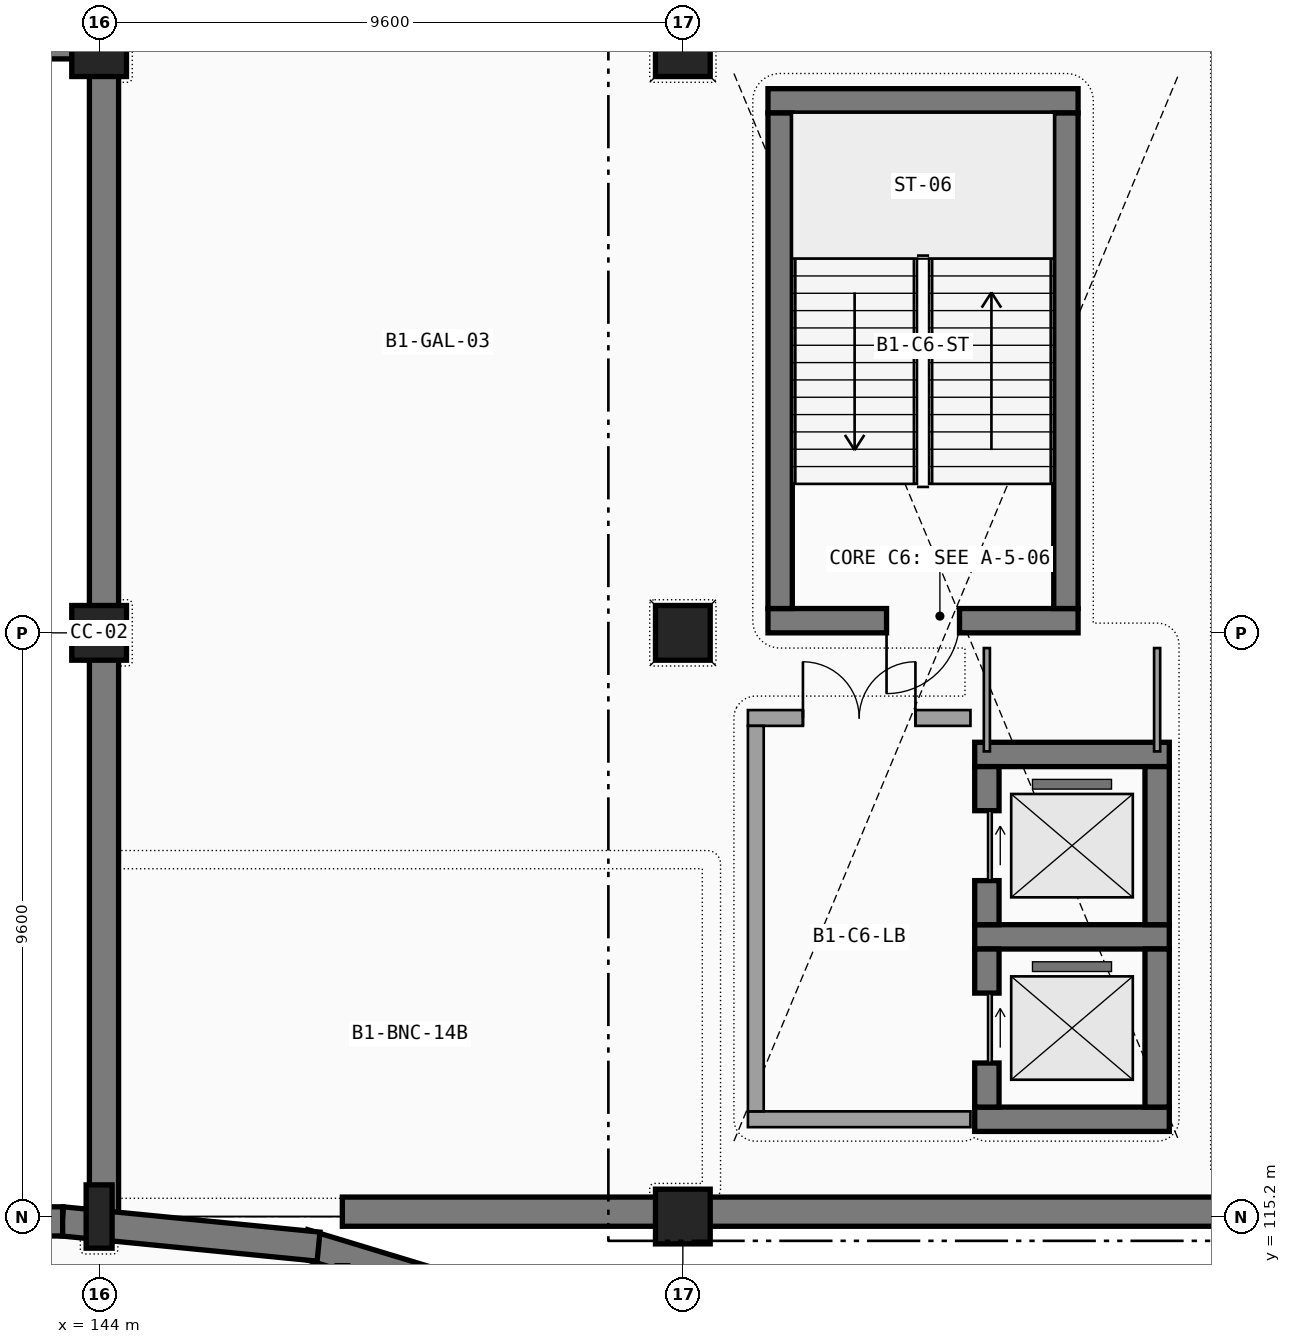
"""IFC4 building model, lengths in metres.
Left out: names, types, materials, properties, quantities, classifications, styles, units other than length and angle.
Written with IfcOpenShell. Run it as: python <this file> out.ifc"""

import sys

from ifc_helpers import new_model, si_unit, direction, frame, frame_2d, origin, origin_2d, place, context, subcontext, project, spatial, rectangle, i_section, extrude, element, fill, save


model = new_model("IFC4")
c1 = context("Model", 3, precision=1e-05, world=origin(), true_north=direction((0.0, 1.0)))
c2 = subcontext(c1, "Body", "Model", "MODEL_VIEW")
j1 = project(units=[si_unit("LENGTHUNIT", "METRE"), si_unit("PLANEANGLEUNIT", "RADIAN")], contexts=[c1])
p1 = place(None, origin())
s1 = spatial("IfcSite", under=j1, at=p1, CompositionType="ELEMENT")
p2 = place(p1, origin())
s2 = spatial("IfcBuilding", under=s1, at=p2, CompositionType="ELEMENT")
p3 = place(p2, frame((0.0, 0.0, -4.8)))
s3 = spatial("IfcBuildingStorey", under=s2, at=p3, CompositionType="ELEMENT", Elevation=-4.8)
p4 = place(p3, frame((144.0, 115.2, 0.0), z_axis=(0.0, 0.0, 1.0), x_axis=(1.0, 0.0, 0.0)))
e1 = element("IfcColumn", 1, at=p4, inside=s3, PredefinedType="COLUMN", context=c2, shape_type="SweptSolid", body=[
    extrude(i_section(OverallWidth=0.427, OverallDepth=1.042, WebThickness=0.031, FlangeThickness=0.056, FilletRadius=0.031, at=origin_2d()), origin(), (0.0, 0.0, 1.0), 4.8),
])
for number, where, z_axis, x_axis in (
    (2, (144.0, 124.8, 0.0), (0.0, 0.0, 1.0), (1.0, 0.0, 0.0)),
    (3, (144.0, 134.4, 0.0), (0.0, 0.0, 1.0), (1.0, 0.0, 0.0)),
    (4, (153.6, 115.2, 0.0), (0.0, 0.0, 1.0), (1.0, 0.0, 0.0)),
    (5, (153.6, 124.8, 0.0), (0.0, 0.0, 1.0), (1.0, 0.0, 0.0)),
    (6, (153.6, 134.4, 0.0), (0.0, 0.0, 1.0), (1.0, 0.0, 0.0)),
):
    element("IfcColumn", number, at=place(p3, frame(where, z_axis=z_axis, x_axis=x_axis)), inside=s3, PredefinedType="COLUMN", context=c2, shape_type="SweptSolid", body=[
        extrude(rectangle(XDim=0.9, YDim=0.9, at=origin_2d()), origin(), (0.0, 0.0, 1.0), 4.8),
    ])
p5 = place(p3, frame((134.4, 134.48, 0.0), z_axis=(0.0, 0.0, 1.0), x_axis=(1.0, 0.0, 0.0)))
e7 = element("IfcWall", 7, at=p5, inside=s3, PredefinedType="USERDEFINED", context=c2, shape_type="SweptSolid", body=[
    extrude(rectangle(XDim=9.17, YDim=0.48, at=frame_2d((4.585, 0.0))), origin(), (0.0, 0.0, 1.0), 3.654),
])
p6 = place(p3, frame((144.08, 133.97, 0.0), z_axis=(0.0, 0.0, 1.0), x_axis=(0.0, -1.0, 0.0)))
e8 = element("IfcWall", 8, at=p6, inside=s3, PredefinedType="USERDEFINED", context=c2, shape_type="SweptSolid", body=[
    extrude(rectangle(XDim=8.74, YDim=0.48, at=frame_2d((4.37, 0.0))), origin(), (0.0, 0.0, 1.0), 3.7),
])
p7 = place(p3, frame((144.08, 124.37, 0.0), z_axis=(0.0, 0.0, 1.0), x_axis=(0.0, -1.0, 0.0)))
e9 = element("IfcWall", 9, at=p7, inside=s3, PredefinedType="USERDEFINED", context=c2, shape_type="SweptSolid", body=[
    extrude(rectangle(XDim=9.17, YDim=0.48, at=frame_2d((4.585, 0.0))), origin(), (0.0, 0.0, 1.0), 3.573),
])
p8 = place(p3, frame((148.0, 115.28, 0.0), z_axis=(0.0, 0.0, 1.0), x_axis=(1.0, 0.0, 0.0)))
e10 = element("IfcWall", 10, at=p8, inside=s3, PredefinedType="USERDEFINED", context=c2, shape_type="SweptSolid", body=[
    extrude(rectangle(XDim=5.17, YDim=0.48, at=frame_2d((2.585, 0.0))), origin(), (0.0, 0.0, 1.0), 3.573),
])
p9 = place(p3, frame((154.03, 115.28, 0.0), z_axis=(0.0, 0.0, 1.0), x_axis=(1.0, 0.0, 0.0)))
e11 = element("IfcWall", 11, at=p9, inside=s3, PredefinedType="USERDEFINED", context=c2, shape_type="SweptSolid", body=[
    extrude(rectangle(XDim=8.74, YDim=0.48, at=frame_2d((4.37, 0.0))), origin(), (0.0, 0.0, 1.0), 3.573),
])
p10 = place(p3, frame((151.528, 113.49, 0.0), z_axis=(0.0, 0.0, 1.0), x_axis=(-0.956928680947, 0.290323095156, 0.0)))
e12 = element("IfcWall", 12, at=p10, inside=s3, PredefinedType="USERDEFINED", context=c2, shape_type="SweptSolid", body=[
    extrude(rectangle(XDim=4.357, YDim=0.48, at=frame_2d((2.178, 0.0))), origin(), (0.0, 0.0, 1.0), 4.5),
])
p11 = place(p3, frame((147.608, 114.705, 0.0), z_axis=(0.0, 0.0, 1.0), x_axis=(-0.995184426144, 0.098020191596, 0.0)))
e13 = element("IfcWall", 13, at=p11, inside=s3, PredefinedType="USERDEFINED", context=c2, shape_type="SweptSolid", body=[
    extrude(rectangle(XDim=4.237, YDim=0.48, at=frame_2d((2.118, 0.0))), origin(), (0.0, 0.0, 1.0), 3.573),
])
p12 = place(p3, frame((143.4, 115.12, 0.0), z_axis=(0.0, 0.0, 1.0), x_axis=(-1.0, 0.0, 0.0)))
e14 = element("IfcWall", 14, at=p12, inside=s3, PredefinedType="USERDEFINED", context=c2, shape_type="SweptSolid", body=[
    extrude(rectangle(XDim=9.0, YDim=0.48, at=frame_2d((4.5, 0.0))), origin(), (0.0, 0.0, 1.0), 3.573),
])
p13 = place(p3, frame((155.0, 125.0, 0.0), z_axis=(0.0, 0.0, 1.0), x_axis=(1.0, 0.0, 0.0)))
e15 = element("IfcWall", 15, at=p13, inside=s3, PredefinedType="SHEAR", context=c2, shape_type="SweptSolid", body=[
    extrude(rectangle(XDim=5.1, YDim=0.4, at=frame_2d((2.55, 0.0))), origin(), (0.0, 0.0, 1.0), 4.5),
])
p14 = place(p13, frame((3.15, 0.0, 0.0), z_axis=(0.0, 0.0, 1.0), x_axis=(-1.0, 0.0, 0.0)))
e16 = element("IfcOpeningElement", 16, at=p14, cuts=e15, PredefinedType="OPENING", context=c2, shape_type="SweptSolid", body=[
    extrude(rectangle(XDim=1.2, YDim=2.2, at=frame_2d((0.6, 1.1))), frame((0.0, 0.21, 0.0), z_axis=(0.0, -1.0, 0.0), x_axis=(1.0, 0.0, 0.0)), (0.0, 0.0, 1.0), 0.42),
])
p15 = place(p3, frame((160.1, 133.55, 0.0), z_axis=(0.0, 0.0, 1.0), x_axis=(-1.0, 0.0, 0.0)))
e17 = element("IfcWall", 17, at=p15, inside=s3, PredefinedType="SHEAR", context=c2, shape_type="SweptSolid", body=[
    extrude(rectangle(XDim=5.1, YDim=0.4, at=frame_2d((2.55, 0.0))), origin(), (0.0, 0.0, 1.0), 4.5),
])
for number, where, z_axis, x_axis in (
    (18, (155.2, 133.35, 0.0), (0.0, 0.0, 1.0), (0.0, -1.0, 0.0)),
    (19, (159.9, 125.2, 0.0), (0.0, 0.0, 1.0), (0.0, 1.0, 0.0)),
):
    element("IfcWall", number, at=place(p3, frame(where, z_axis=z_axis, x_axis=x_axis)), inside=s3, PredefinedType="SHEAR", context=c2, shape_type="SweptSolid", body=[
        extrude(rectangle(XDim=8.15, YDim=0.4, at=frame_2d((4.075, 0.0))), origin(), (0.0, 0.0, 1.0), 4.5),
    ])
for number, where, z_axis, x_axis in (
    (20, (158.4, 116.8, 0.0), (0.0, 0.0, 1.0), (1.0, 0.0, 0.0)),
    (21, (161.6, 119.8, 0.0), (0.0, 0.0, 1.0), (-1.0, 0.0, 0.0)),
):
    element("IfcWall", number, at=place(p3, frame(where, z_axis=z_axis, x_axis=x_axis)), inside=s3, PredefinedType="SHEAR", context=c2, shape_type="SweptSolid", body=[
        extrude(rectangle(XDim=3.2, YDim=0.4, at=frame_2d((1.6, 0.0))), origin(), (0.0, 0.0, 1.0), 4.5),
    ])
p16 = place(p3, frame((158.6, 119.6, 0.0), z_axis=(0.0, 0.0, 1.0), x_axis=(0.0, -1.0, 0.0)))
e22 = element("IfcWall", 22, at=p16, inside=s3, PredefinedType="SHEAR", context=c2, shape_type="SweptSolid", body=[
    extrude(rectangle(XDim=2.6, YDim=0.4, at=frame_2d((1.3, 0.0))), origin(), (0.0, 0.0, 1.0), 4.5),
])
p17 = place(p16, frame((0.725, 0.0, 0.0), z_axis=(0.0, 0.0, 1.0), x_axis=(1.0, 0.0, 0.0)))
e23 = element("IfcOpeningElement", 23, at=p17, cuts=e22, PredefinedType="OPENING", context=c2, shape_type="SweptSolid", body=[
    extrude(rectangle(XDim=1.15, YDim=2.2, at=frame_2d((0.575, 1.1))), frame((0.0, 0.21, 0.0), z_axis=(0.0, -1.0, 0.0), x_axis=(1.0, 0.0, 0.0)), (0.0, 0.0, 1.0), 0.42),
])
p18 = place(p3, frame((161.4, 117.0, 0.0), z_axis=(0.0, 0.0, 1.0), x_axis=(0.0, 1.0, 0.0)))
e24 = element("IfcWall", 24, at=p18, inside=s3, PredefinedType="SHEAR", context=c2, shape_type="SweptSolid", body=[
    extrude(rectangle(XDim=2.6, YDim=0.4, at=frame_2d((1.3, 0.0))), origin(), (0.0, 0.0, 1.0), 4.5),
])
p19 = place(p3, frame((161.6, 122.8, 0.0), z_axis=(0.0, 0.0, 1.0), x_axis=(-1.0, 0.0, 0.0)))
e25 = element("IfcWall", 25, at=p19, inside=s3, PredefinedType="SHEAR", context=c2, shape_type="SweptSolid", body=[
    extrude(rectangle(XDim=3.2, YDim=0.4, at=frame_2d((1.6, 0.0))), origin(), (0.0, 0.0, 1.0), 4.5),
])
p20 = place(p3, frame((158.6, 122.6, 0.0), z_axis=(0.0, 0.0, 1.0), x_axis=(0.0, -1.0, 0.0)))
e26 = element("IfcWall", 26, at=p20, inside=s3, PredefinedType="SHEAR", context=c2, shape_type="SweptSolid", body=[
    extrude(rectangle(XDim=2.6, YDim=0.4, at=frame_2d((1.3, 0.0))), origin(), (0.0, 0.0, 1.0), 4.5),
])
p21 = place(p20, frame((0.725, 0.0, 0.0), z_axis=(0.0, 0.0, 1.0), x_axis=(1.0, 0.0, 0.0)))
e27 = element("IfcOpeningElement", 27, at=p21, cuts=e26, PredefinedType="OPENING", context=c2, shape_type="SweptSolid", body=[
    extrude(rectangle(XDim=1.15, YDim=2.2, at=frame_2d((0.575, 1.1))), frame((0.0, 0.21, 0.0), z_axis=(0.0, -1.0, 0.0), x_axis=(1.0, 0.0, 0.0)), (0.0, 0.0, 1.0), 0.42),
])
p22 = place(p3, frame((161.4, 120.0, 0.0), z_axis=(0.0, 0.0, 1.0), x_axis=(0.0, 1.0, 0.0)))
e28 = element("IfcWall", 28, at=p22, inside=s3, PredefinedType="SHEAR", context=c2, shape_type="SweptSolid", body=[
    extrude(rectangle(XDim=2.6, YDim=0.4, at=frame_2d((1.3, 0.0))), origin(), (0.0, 0.0, 1.0), 4.5),
])
for number, where, z_axis, x_axis in (
    (29, (158.6, 124.55, 0.0), (0.0, 0.0, 1.0), (0.0, -1.0, 0.0)),
    (30, (161.4, 122.85, 0.0), (0.0, 0.0, 1.0), (0.0, 1.0, 0.0)),
):
    element("IfcWall", number, at=place(p3, frame(where, z_axis=z_axis, x_axis=x_axis)), inside=s3, PredefinedType="PARTITIONING", context=c2, shape_type="SweptSolid", body=[
        extrude(rectangle(XDim=1.7, YDim=0.1, at=frame_2d((0.85, 0.0))), origin(), (0.0, 0.0, 1.0), 4.5),
    ])
p23 = place(p3, frame((154.67, 116.8, 0.0), z_axis=(0.0, 0.0, 1.0), x_axis=(1.0, 0.0, 0.0)))
e31 = element("IfcWall", 31, at=p23, inside=s3, PredefinedType="SOLIDWALL", context=c2, shape_type="SweptSolid", body=[
    extrude(rectangle(XDim=3.66, YDim=0.26, at=frame_2d((1.83, 0.0))), origin(), (0.0, 0.0, 1.0), 4.5),
])
p24 = place(p3, frame((158.33, 123.4, 0.0), z_axis=(0.0, 0.0, 1.0), x_axis=(-1.0, 0.0, 0.0)))
e32 = element("IfcWall", 32, at=p24, inside=s3, PredefinedType="SOLIDWALL", context=c2, shape_type="SweptSolid", body=[
    extrude(rectangle(XDim=3.66, YDim=0.26, at=frame_2d((1.83, 0.0))), origin(), (0.0, 0.0, 1.0), 4.5),
])
p25 = place(p24, frame((2.755, 0.0, 0.0), z_axis=(0.0, 0.0, 1.0), x_axis=(-1.0, 0.0, 0.0)))
e33 = element("IfcOpeningElement", 33, at=p25, cuts=e32, PredefinedType="OPENING", context=c2, shape_type="SweptSolid", body=[
    extrude(rectangle(XDim=1.85, YDim=2.25, at=frame_2d((0.925, 1.125))), frame((0.0, 0.14, 0.0), z_axis=(0.0, -1.0, 0.0), x_axis=(1.0, 0.0, 0.0)), (0.0, 0.0, 1.0), 0.28),
])
p26 = place(p3, frame((154.8, 123.27, 0.0), z_axis=(0.0, 0.0, 1.0), x_axis=(0.0, -1.0, 0.0)))
e34 = element("IfcWall", 34, at=p26, inside=s3, PredefinedType="SOLIDWALL", context=c2, shape_type="SweptSolid", body=[
    extrude(rectangle(XDim=6.34, YDim=0.26, at=frame_2d((3.17, 0.0))), origin(), (0.0, 0.0, 1.0), 4.5),
])
p27 = place(p14, origin())
e35 = element("IfcDoor", 35, at=p27, inside=s3, OperationType="SINGLE_SWING_RIGHT", PredefinedType="DOOR", context=c2, shape_type="SweptSolid", body=[
    extrude(rectangle(XDim=1.2, YDim=2.2, at=frame_2d((0.6, 1.1))), frame((0.0, 0.025, 0.0), z_axis=(0.0, -1.0, 0.0), x_axis=(1.0, 0.0, 0.0)), (0.0, 0.0, 1.0), 0.05),
])
fill(e16, e35)
p28 = place(p17, origin())
e36 = element("IfcDoor", 36, at=p28, inside=s3, OperationType="SLIDING_TO_LEFT", PredefinedType="DOOR", context=c2, shape_type="SweptSolid", body=[
    extrude(rectangle(XDim=1.15, YDim=2.2, at=frame_2d((0.575, 1.1))), frame((0.0, 0.025, 0.0), z_axis=(0.0, -1.0, 0.0), x_axis=(1.0, 0.0, 0.0)), (0.0, 0.0, 1.0), 0.05),
])
fill(e23, e36)
p29 = place(p21, origin())
e37 = element("IfcDoor", 37, at=p29, inside=s3, OperationType="SLIDING_TO_LEFT", PredefinedType="DOOR", context=c2, shape_type="SweptSolid", body=[
    extrude(rectangle(XDim=1.15, YDim=2.2, at=frame_2d((0.575, 1.1))), frame((0.0, 0.025, 0.0), z_axis=(0.0, -1.0, 0.0), x_axis=(1.0, 0.0, 0.0)), (0.0, 0.0, 1.0), 0.05),
])
fill(e27, e37)
p30 = place(p25, origin())
e38 = element("IfcDoor", 38, at=p30, inside=s3, OperationType="DOUBLE_DOOR_SINGLE_SWING", PredefinedType="DOOR", context=c2, shape_type="SweptSolid", body=[
    extrude(rectangle(XDim=1.85, YDim=2.25, at=frame_2d((0.925, 1.125))), frame((0.0, 0.025, 0.0), z_axis=(0.0, -1.0, 0.0), x_axis=(1.0, 0.0, 0.0)), (0.0, 0.0, 1.0), 0.05),
])
fill(e33, e38)
save(model, sys.argv[1])
